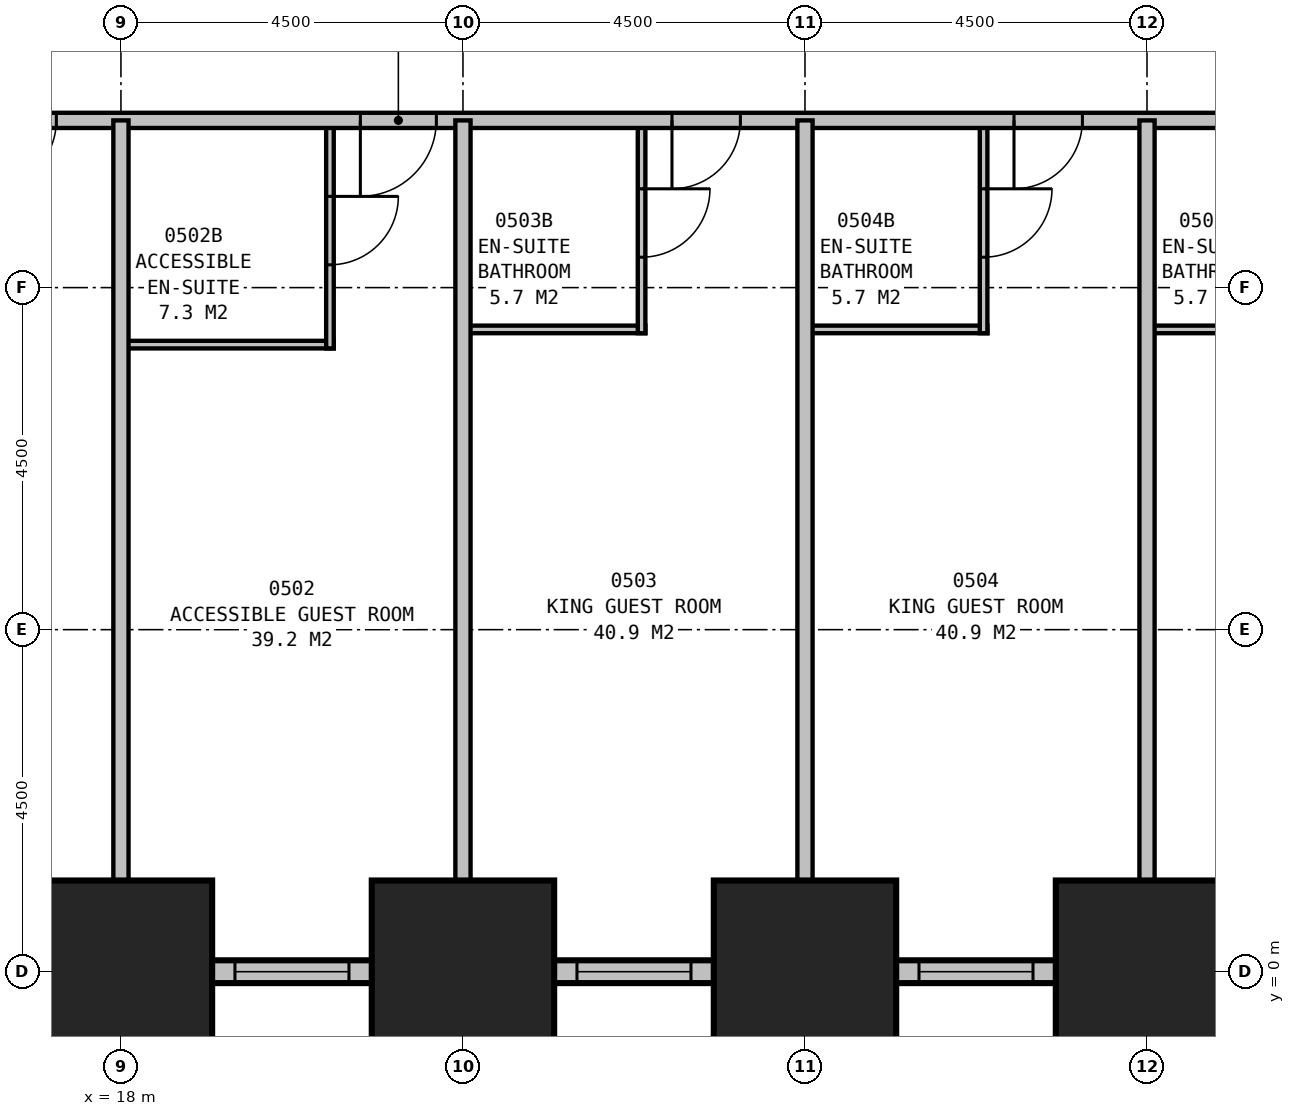
"""IFC4 building model, lengths in metres.
Left out: names, types, materials, properties, quantities, classifications, styles, units other than length and angle.
Written with IfcOpenShell. Run it as: python <this file> out.ifc"""

import sys

from ifc_helpers import new_model, si_unit, direction, frame, frame_2d, origin, origin_2d, place, context, subcontext, project, spatial, rectangle, extrude, element, fill, save


model = new_model("IFC4")
c1 = context("Model", 3, precision=1e-05, world=origin(), true_north=direction((0.0, 1.0)))
c2 = subcontext(c1, "Body", "Model", "MODEL_VIEW")
j1 = project(units=[si_unit("LENGTHUNIT", "METRE"), si_unit("PLANEANGLEUNIT", "RADIAN")], contexts=[c1])
p1 = place(None, origin())
s1 = spatial("IfcSite", under=j1, at=p1, CompositionType="ELEMENT")
p2 = place(p1, origin())
s2 = spatial("IfcBuilding", under=s1, at=p2, CompositionType="ELEMENT")
p3 = place(p2, frame((0.0, 0.0, 29.7)))
s3 = spatial("IfcBuildingStorey", under=s2, at=p3, CompositionType="ELEMENT", Elevation=29.7)
for number, where, z_axis, x_axis in (
    (1, (18.0, 0.0, 0.0), (0.0, 0.0, 1.0), (1.0, 0.0, 0.0)),
    (2, (22.5, 0.0, 0.0), (0.0, 0.0, 1.0), (1.0, 0.0, 0.0)),
    (3, (27.0, 0.0, 0.0), (0.0, 0.0, 1.0), (1.0, 0.0, 0.0)),
    (4, (31.5, 0.0, 0.0), (0.0, 0.0, 1.0), (1.0, 0.0, 0.0)),
):
    element("IfcColumn", number, at=place(p3, frame(where, z_axis=z_axis, x_axis=x_axis)), inside=s3, PredefinedType="COLUMN", context=c2, shape_type="SweptSolid", body=[
        extrude(rectangle(XDim=2.4, YDim=2.4, at=origin_2d()), origin(), (0.0, 0.0, 1.0), 3.5),
    ])
p4 = place(p3, frame((4.35, 0.0, 0.0), z_axis=(0.0, 0.0, 1.0), x_axis=(1.0, 0.0, 0.0)))
e5 = element("IfcWall", 5, at=p4, inside=s3, PredefinedType="STANDARD", context=c2, shape_type="SweptSolid", body=[
    extrude(rectangle(XDim=40.8, YDim=0.3, at=frame_2d((20.4, 0.0))), origin(), (0.0, 0.0, 1.0), 2.05),
])
p5 = place(p4, frame((1.65, 0.0, 0.5)))
e6 = element("IfcOpeningElement", 6, at=p5, cuts=e5, PredefinedType="OPENING", context=c2, shape_type="SweptSolid", body=[
    extrude(rectangle(XDim=1.5, YDim=1.4, at=frame_2d((0.75, 0.7))), frame((0.0, 0.16, 0.0), z_axis=(0.0, -1.0, 0.0), x_axis=(1.0, 0.0, 0.0)), (0.0, 0.0, 1.0), 0.32),
])
p6 = place(p4, frame((6.15, 0.0, 0.5)))
e7 = element("IfcOpeningElement", 7, at=p6, cuts=e5, PredefinedType="OPENING", context=c2, shape_type="SweptSolid", body=[
    extrude(rectangle(XDim=1.5, YDim=1.4, at=frame_2d((0.75, 0.7))), frame((0.0, 0.16, 0.0), z_axis=(0.0, -1.0, 0.0), x_axis=(1.0, 0.0, 0.0)), (0.0, 0.0, 1.0), 0.32),
])
p7 = place(p4, frame((10.65, 0.0, 0.5)))
e8 = element("IfcOpeningElement", 8, at=p7, cuts=e5, PredefinedType="OPENING", context=c2, shape_type="SweptSolid", body=[
    extrude(rectangle(XDim=1.5, YDim=1.4, at=frame_2d((0.75, 0.7))), frame((0.0, 0.16, 0.0), z_axis=(0.0, -1.0, 0.0), x_axis=(1.0, 0.0, 0.0)), (0.0, 0.0, 1.0), 0.32),
])
p8 = place(p4, frame((15.15, 0.0, 0.5)))
e9 = element("IfcOpeningElement", 9, at=p8, cuts=e5, PredefinedType="OPENING", context=c2, shape_type="SweptSolid", body=[
    extrude(rectangle(XDim=1.5, YDim=1.4, at=frame_2d((0.75, 0.7))), frame((0.0, 0.16, 0.0), z_axis=(0.0, -1.0, 0.0), x_axis=(1.0, 0.0, 0.0)), (0.0, 0.0, 1.0), 0.32),
])
p9 = place(p4, frame((19.65, 0.0, 0.5)))
e10 = element("IfcOpeningElement", 10, at=p9, cuts=e5, PredefinedType="OPENING", context=c2, shape_type="SweptSolid", body=[
    extrude(rectangle(XDim=1.5, YDim=1.4, at=frame_2d((0.75, 0.7))), frame((0.0, 0.16, 0.0), z_axis=(0.0, -1.0, 0.0), x_axis=(1.0, 0.0, 0.0)), (0.0, 0.0, 1.0), 0.32),
])
p10 = place(p4, frame((24.15, 0.0, 0.5)))
e11 = element("IfcOpeningElement", 11, at=p10, cuts=e5, PredefinedType="OPENING", context=c2, shape_type="SweptSolid", body=[
    extrude(rectangle(XDim=1.5, YDim=1.4, at=frame_2d((0.75, 0.7))), frame((0.0, 0.16, 0.0), z_axis=(0.0, -1.0, 0.0), x_axis=(1.0, 0.0, 0.0)), (0.0, 0.0, 1.0), 0.32),
])
p11 = place(p4, frame((28.65, 0.0, 0.5)))
e12 = element("IfcOpeningElement", 12, at=p11, cuts=e5, PredefinedType="OPENING", context=c2, shape_type="SweptSolid", body=[
    extrude(rectangle(XDim=1.5, YDim=1.4, at=frame_2d((0.75, 0.7))), frame((0.0, 0.16, 0.0), z_axis=(0.0, -1.0, 0.0), x_axis=(1.0, 0.0, 0.0)), (0.0, 0.0, 1.0), 0.32),
])
p12 = place(p4, frame((33.15, 0.0, 0.5)))
e13 = element("IfcOpeningElement", 13, at=p12, cuts=e5, PredefinedType="OPENING", context=c2, shape_type="SweptSolid", body=[
    extrude(rectangle(XDim=1.5, YDim=1.4, at=frame_2d((0.75, 0.7))), frame((0.0, 0.16, 0.0), z_axis=(0.0, -1.0, 0.0), x_axis=(1.0, 0.0, 0.0)), (0.0, 0.0, 1.0), 0.32),
])
p13 = place(p4, frame((37.65, 0.0, 0.5)))
e14 = element("IfcOpeningElement", 14, at=p13, cuts=e5, PredefinedType="OPENING", context=c2, shape_type="SweptSolid", body=[
    extrude(rectangle(XDim=1.5, YDim=1.4, at=frame_2d((0.75, 0.7))), frame((0.0, 0.16, 0.0), z_axis=(0.0, -1.0, 0.0), x_axis=(1.0, 0.0, 0.0)), (0.0, 0.0, 1.0), 0.32),
])
p14 = place(p3, frame((11.2, 11.2, 0.0), z_axis=(0.0, 0.0, 1.0), x_axis=(1.0, 0.0, 0.0)))
e15 = element("IfcWall", 15, at=p14, inside=s3, PredefinedType="PARTITIONING", context=c2, shape_type="SweptSolid", body=[
    extrude(rectangle(XDim=27.1, YDim=0.2, at=frame_2d((13.55, 0.0))), origin(), (0.0, 0.0, 1.0), 3.25),
])
p15 = place(p14, frame((5.95, 0.0, 0.0), z_axis=(0.0, 0.0, 1.0), x_axis=(-1.0, 0.0, 0.0)))
e16 = element("IfcOpeningElement", 16, at=p15, cuts=e15, PredefinedType="OPENING", context=c2, shape_type="SweptSolid", body=[
    extrude(rectangle(XDim=0.9, YDim=2.1, at=frame_2d((0.45, 1.05))), frame((0.0, 0.11, 0.0), z_axis=(0.0, -1.0, 0.0), x_axis=(1.0, 0.0, 0.0)), (0.0, 0.0, 1.0), 0.22),
])
p16 = place(p14, frame((10.95, 0.0, 0.0), z_axis=(0.0, 0.0, 1.0), x_axis=(-1.0, 0.0, 0.0)))
e17 = element("IfcOpeningElement", 17, at=p16, cuts=e15, PredefinedType="OPENING", context=c2, shape_type="SweptSolid", body=[
    extrude(rectangle(XDim=1.0, YDim=2.1, at=frame_2d((0.5, 1.05))), frame((0.0, 0.11, 0.0), z_axis=(0.0, -1.0, 0.0), x_axis=(1.0, 0.0, 0.0)), (0.0, 0.0, 1.0), 0.22),
])
p17 = place(p14, frame((14.95, 0.0, 0.0), z_axis=(0.0, 0.0, 1.0), x_axis=(-1.0, 0.0, 0.0)))
e18 = element("IfcOpeningElement", 18, at=p17, cuts=e15, PredefinedType="OPENING", context=c2, shape_type="SweptSolid", body=[
    extrude(rectangle(XDim=0.9, YDim=2.1, at=frame_2d((0.45, 1.05))), frame((0.0, 0.11, 0.0), z_axis=(0.0, -1.0, 0.0), x_axis=(1.0, 0.0, 0.0)), (0.0, 0.0, 1.0), 0.22),
])
p18 = place(p14, frame((19.45, 0.0, 0.0), z_axis=(0.0, 0.0, 1.0), x_axis=(-1.0, 0.0, 0.0)))
e19 = element("IfcOpeningElement", 19, at=p18, cuts=e15, PredefinedType="OPENING", context=c2, shape_type="SweptSolid", body=[
    extrude(rectangle(XDim=0.9, YDim=2.1, at=frame_2d((0.45, 1.05))), frame((0.0, 0.11, 0.0), z_axis=(0.0, -1.0, 0.0), x_axis=(1.0, 0.0, 0.0)), (0.0, 0.0, 1.0), 0.22),
])
p19 = place(p14, frame((23.95, 0.0, 0.0), z_axis=(0.0, 0.0, 1.0), x_axis=(-1.0, 0.0, 0.0)))
e20 = element("IfcOpeningElement", 20, at=p19, cuts=e15, PredefinedType="OPENING", context=c2, shape_type="SweptSolid", body=[
    extrude(rectangle(XDim=0.9, YDim=2.1, at=frame_2d((0.45, 1.05))), frame((0.0, 0.11, 0.0), z_axis=(0.0, -1.0, 0.0), x_axis=(1.0, 0.0, 0.0)), (0.0, 0.0, 1.0), 0.22),
])
p20 = place(p14, frame((1.6, 0.0, 0.0), z_axis=(0.0, 0.0, 1.0), x_axis=(-1.0, 0.0, 0.0)))
e21 = element("IfcOpeningElement", 21, at=p20, cuts=e15, PredefinedType="OPENING", context=c2, shape_type="SweptSolid", body=[
    extrude(rectangle(XDim=0.9, YDim=2.1, at=frame_2d((0.45, 1.05))), frame((0.0, 0.11, 0.0), z_axis=(0.0, -1.0, 0.0), x_axis=(1.0, 0.0, 0.0)), (0.0, 0.0, 1.0), 0.22),
])
p21 = place(p14, frame((26.4, 0.0, 0.0), z_axis=(0.0, 0.0, 1.0), x_axis=(-1.0, 0.0, 0.0)))
e22 = element("IfcOpeningElement", 22, at=p21, cuts=e15, PredefinedType="OPENING", context=c2, shape_type="SweptSolid", body=[
    extrude(rectangle(XDim=0.9, YDim=2.1, at=frame_2d((0.45, 1.05))), frame((0.0, 0.11, 0.0), z_axis=(0.0, -1.0, 0.0), x_axis=(1.0, 0.0, 0.0)), (0.0, 0.0, 1.0), 0.22),
])
for number, where, z_axis, x_axis in (
    (23, (18.0, 11.2, 0.0), (0.0, 0.0, 1.0), (0.0, -1.0, 0.0)),
    (24, (22.5, 11.2, 0.0), (0.0, 0.0, 1.0), (0.0, -1.0, 0.0)),
    (25, (27.0, 11.2, 0.0), (0.0, 0.0, 1.0), (0.0, -1.0, 0.0)),
    (26, (31.5, 11.2, 0.0), (0.0, 0.0, 1.0), (0.0, -1.0, 0.0)),
):
    element("IfcWall", number, at=place(p3, frame(where, z_axis=z_axis, x_axis=x_axis)), inside=s3, PredefinedType="PARTITIONING", context=c2, shape_type="SweptSolid", body=[
        extrude(rectangle(XDim=11.2, YDim=0.2, at=frame_2d((5.6, 0.0))), origin(), (0.0, 0.0, 1.0), 2.25),
    ])
p22 = place(p3, frame((18.0, 8.25, 0.0), z_axis=(0.0, 0.0, 1.0), x_axis=(1.0, 0.0, 0.0)))
e27 = element("IfcWall", 27, at=p22, inside=s3, PredefinedType="PLUMBINGWALL", context=c2, shape_type="SweptSolid", body=[
    extrude(rectangle(XDim=2.8, YDim=0.1, at=frame_2d((1.4, 0.0))), origin(), (0.0, 0.0, 1.0), 3.25),
])
p23 = place(p3, frame((20.75, 11.2, 0.0), z_axis=(0.0, 0.0, 1.0), x_axis=(0.0, -1.0, 0.0)))
e28 = element("IfcWall", 28, at=p23, inside=s3, PredefinedType="PLUMBINGWALL", context=c2, shape_type="SweptSolid", body=[
    extrude(rectangle(XDim=3.0, YDim=0.1, at=frame_2d((1.5, 0.0))), origin(), (0.0, 0.0, 1.0), 3.25),
])
p24 = place(p23, frame((1.0, 0.0, 0.0)))
e29 = element("IfcOpeningElement", 29, at=p24, cuts=e28, PredefinedType="OPENING", context=c2, shape_type="SweptSolid", body=[
    extrude(rectangle(XDim=0.9, YDim=2.1, at=frame_2d((0.45, 1.05))), frame((0.0, 0.06, 0.0), z_axis=(0.0, -1.0, 0.0), x_axis=(1.0, 0.0, 0.0)), (0.0, 0.0, 1.0), 0.12),
])
p25 = place(p3, frame((22.5, 8.45, 0.0), z_axis=(0.0, 0.0, 1.0), x_axis=(1.0, 0.0, 0.0)))
e30 = element("IfcWall", 30, at=p25, inside=s3, PredefinedType="PLUMBINGWALL", context=c2, shape_type="SweptSolid", body=[
    extrude(rectangle(XDim=2.4, YDim=0.1, at=frame_2d((1.2, 0.0))), origin(), (0.0, 0.0, 1.0), 3.25),
])
p26 = place(p3, frame((24.85, 11.2, 0.0), z_axis=(0.0, 0.0, 1.0), x_axis=(0.0, -1.0, 0.0)))
e31 = element("IfcWall", 31, at=p26, inside=s3, PredefinedType="PLUMBINGWALL", context=c2, shape_type="SweptSolid", body=[
    extrude(rectangle(XDim=2.8, YDim=0.1, at=frame_2d((1.4, 0.0))), origin(), (0.0, 0.0, 1.0), 3.25),
])
p27 = place(p26, frame((0.9, 0.0, 0.0)))
e32 = element("IfcOpeningElement", 32, at=p27, cuts=e31, PredefinedType="OPENING", context=c2, shape_type="SweptSolid", body=[
    extrude(rectangle(XDim=0.9, YDim=2.1, at=frame_2d((0.45, 1.05))), frame((0.0, 0.06, 0.0), z_axis=(0.0, -1.0, 0.0), x_axis=(1.0, 0.0, 0.0)), (0.0, 0.0, 1.0), 0.12),
])
p28 = place(p3, frame((27.0, 8.45, 0.0), z_axis=(0.0, 0.0, 1.0), x_axis=(1.0, 0.0, 0.0)))
e33 = element("IfcWall", 33, at=p28, inside=s3, PredefinedType="PLUMBINGWALL", context=c2, shape_type="SweptSolid", body=[
    extrude(rectangle(XDim=2.4, YDim=0.1, at=frame_2d((1.2, 0.0))), origin(), (0.0, 0.0, 1.0), 3.25),
])
p29 = place(p3, frame((29.35, 11.2, 0.0), z_axis=(0.0, 0.0, 1.0), x_axis=(0.0, -1.0, 0.0)))
e34 = element("IfcWall", 34, at=p29, inside=s3, PredefinedType="PLUMBINGWALL", context=c2, shape_type="SweptSolid", body=[
    extrude(rectangle(XDim=2.8, YDim=0.1, at=frame_2d((1.4, 0.0))), origin(), (0.0, 0.0, 1.0), 3.25),
])
p30 = place(p29, frame((0.9, 0.0, 0.0)))
e35 = element("IfcOpeningElement", 35, at=p30, cuts=e34, PredefinedType="OPENING", context=c2, shape_type="SweptSolid", body=[
    extrude(rectangle(XDim=0.9, YDim=2.1, at=frame_2d((0.45, 1.05))), frame((0.0, 0.06, 0.0), z_axis=(0.0, -1.0, 0.0), x_axis=(1.0, 0.0, 0.0)), (0.0, 0.0, 1.0), 0.12),
])
p31 = place(p3, frame((31.5, 8.45, 0.0), z_axis=(0.0, 0.0, 1.0), x_axis=(1.0, 0.0, 0.0)))
e36 = element("IfcWall", 36, at=p31, inside=s3, PredefinedType="PLUMBINGWALL", context=c2, shape_type="SweptSolid", body=[
    extrude(rectangle(XDim=2.4, YDim=0.1, at=frame_2d((1.2, 0.0))), origin(), (0.0, 0.0, 1.0), 3.25),
])
p32 = place(p8, origin())
e37 = element("IfcWindow", 37, at=p32, inside=s3, PartitioningType="SINGLE_PANEL", PredefinedType="WINDOW", context=c2, shape_type="SweptSolid", body=[
    extrude(rectangle(XDim=1.5, YDim=1.4, at=frame_2d((0.75, 0.7))), frame((0.0, 0.03, 0.0), z_axis=(0.0, -1.0, 0.0), x_axis=(1.0, 0.0, 0.0)), (0.0, 0.0, 1.0), 0.06),
])
fill(e9, e37)
p33 = place(p9, origin())
e38 = element("IfcWindow", 38, at=p33, inside=s3, PartitioningType="SINGLE_PANEL", PredefinedType="WINDOW", context=c2, shape_type="SweptSolid", body=[
    extrude(rectangle(XDim=1.5, YDim=1.4, at=frame_2d((0.75, 0.7))), frame((0.0, 0.03, 0.0), z_axis=(0.0, -1.0, 0.0), x_axis=(1.0, 0.0, 0.0)), (0.0, 0.0, 1.0), 0.06),
])
fill(e10, e38)
p34 = place(p10, origin())
e39 = element("IfcWindow", 39, at=p34, inside=s3, PartitioningType="SINGLE_PANEL", PredefinedType="WINDOW", context=c2, shape_type="SweptSolid", body=[
    extrude(rectangle(XDim=1.5, YDim=1.4, at=frame_2d((0.75, 0.7))), frame((0.0, 0.03, 0.0), z_axis=(0.0, -1.0, 0.0), x_axis=(1.0, 0.0, 0.0)), (0.0, 0.0, 1.0), 0.06),
])
fill(e11, e39)
p35 = place(p15, origin())
e40 = element("IfcDoor", 40, at=p35, inside=s3, OperationType="SINGLE_SWING_RIGHT", PredefinedType="DOOR", context=c2, shape_type="SweptSolid", body=[
    extrude(rectangle(XDim=0.9, YDim=2.1, at=frame_2d((0.45, 1.05))), frame((0.0, 0.025, 0.0), z_axis=(0.0, -1.0, 0.0), x_axis=(1.0, 0.0, 0.0)), (0.0, 0.0, 1.0), 0.05),
])
fill(e16, e40)
p36 = place(p16, origin())
e41 = element("IfcDoor", 41, at=p36, inside=s3, OperationType="SINGLE_SWING_RIGHT", PredefinedType="DOOR", context=c2, shape_type="SweptSolid", body=[
    extrude(rectangle(XDim=1.0, YDim=2.1, at=frame_2d((0.5, 1.05))), frame((0.0, 0.025, 0.0), z_axis=(0.0, -1.0, 0.0), x_axis=(1.0, 0.0, 0.0)), (0.0, 0.0, 1.0), 0.05),
])
fill(e17, e41)
p37 = place(p17, origin())
e42 = element("IfcDoor", 42, at=p37, inside=s3, OperationType="SINGLE_SWING_RIGHT", PredefinedType="DOOR", context=c2, shape_type="SweptSolid", body=[
    extrude(rectangle(XDim=0.9, YDim=2.1, at=frame_2d((0.45, 1.05))), frame((0.0, 0.025, 0.0), z_axis=(0.0, -1.0, 0.0), x_axis=(1.0, 0.0, 0.0)), (0.0, 0.0, 1.0), 0.05),
])
fill(e18, e42)
p38 = place(p18, origin())
e43 = element("IfcDoor", 43, at=p38, inside=s3, OperationType="SINGLE_SWING_RIGHT", PredefinedType="DOOR", context=c2, shape_type="SweptSolid", body=[
    extrude(rectangle(XDim=0.9, YDim=2.1, at=frame_2d((0.45, 1.05))), frame((0.0, 0.025, 0.0), z_axis=(0.0, -1.0, 0.0), x_axis=(1.0, 0.0, 0.0)), (0.0, 0.0, 1.0), 0.05),
])
fill(e19, e43)
p39 = place(p24, origin())
e44 = element("IfcDoor", 44, at=p39, inside=s3, OperationType="SINGLE_SWING_LEFT", PredefinedType="DOOR", context=c2, shape_type="SweptSolid", body=[
    extrude(rectangle(XDim=0.9, YDim=2.1, at=frame_2d((0.45, 1.05))), frame((0.0, 0.025, 0.0), z_axis=(0.0, -1.0, 0.0), x_axis=(1.0, 0.0, 0.0)), (0.0, 0.0, 1.0), 0.05),
])
fill(e29, e44)
p40 = place(p27, origin())
e45 = element("IfcDoor", 45, at=p40, inside=s3, OperationType="SINGLE_SWING_LEFT", PredefinedType="DOOR", context=c2, shape_type="SweptSolid", body=[
    extrude(rectangle(XDim=0.9, YDim=2.1, at=frame_2d((0.45, 1.05))), frame((0.0, 0.025, 0.0), z_axis=(0.0, -1.0, 0.0), x_axis=(1.0, 0.0, 0.0)), (0.0, 0.0, 1.0), 0.05),
])
fill(e32, e45)
p41 = place(p30, origin())
e46 = element("IfcDoor", 46, at=p41, inside=s3, OperationType="SINGLE_SWING_LEFT", PredefinedType="DOOR", context=c2, shape_type="SweptSolid", body=[
    extrude(rectangle(XDim=0.9, YDim=2.1, at=frame_2d((0.45, 1.05))), frame((0.0, 0.025, 0.0), z_axis=(0.0, -1.0, 0.0), x_axis=(1.0, 0.0, 0.0)), (0.0, 0.0, 1.0), 0.05),
])
fill(e35, e46)
save(model, sys.argv[1])
